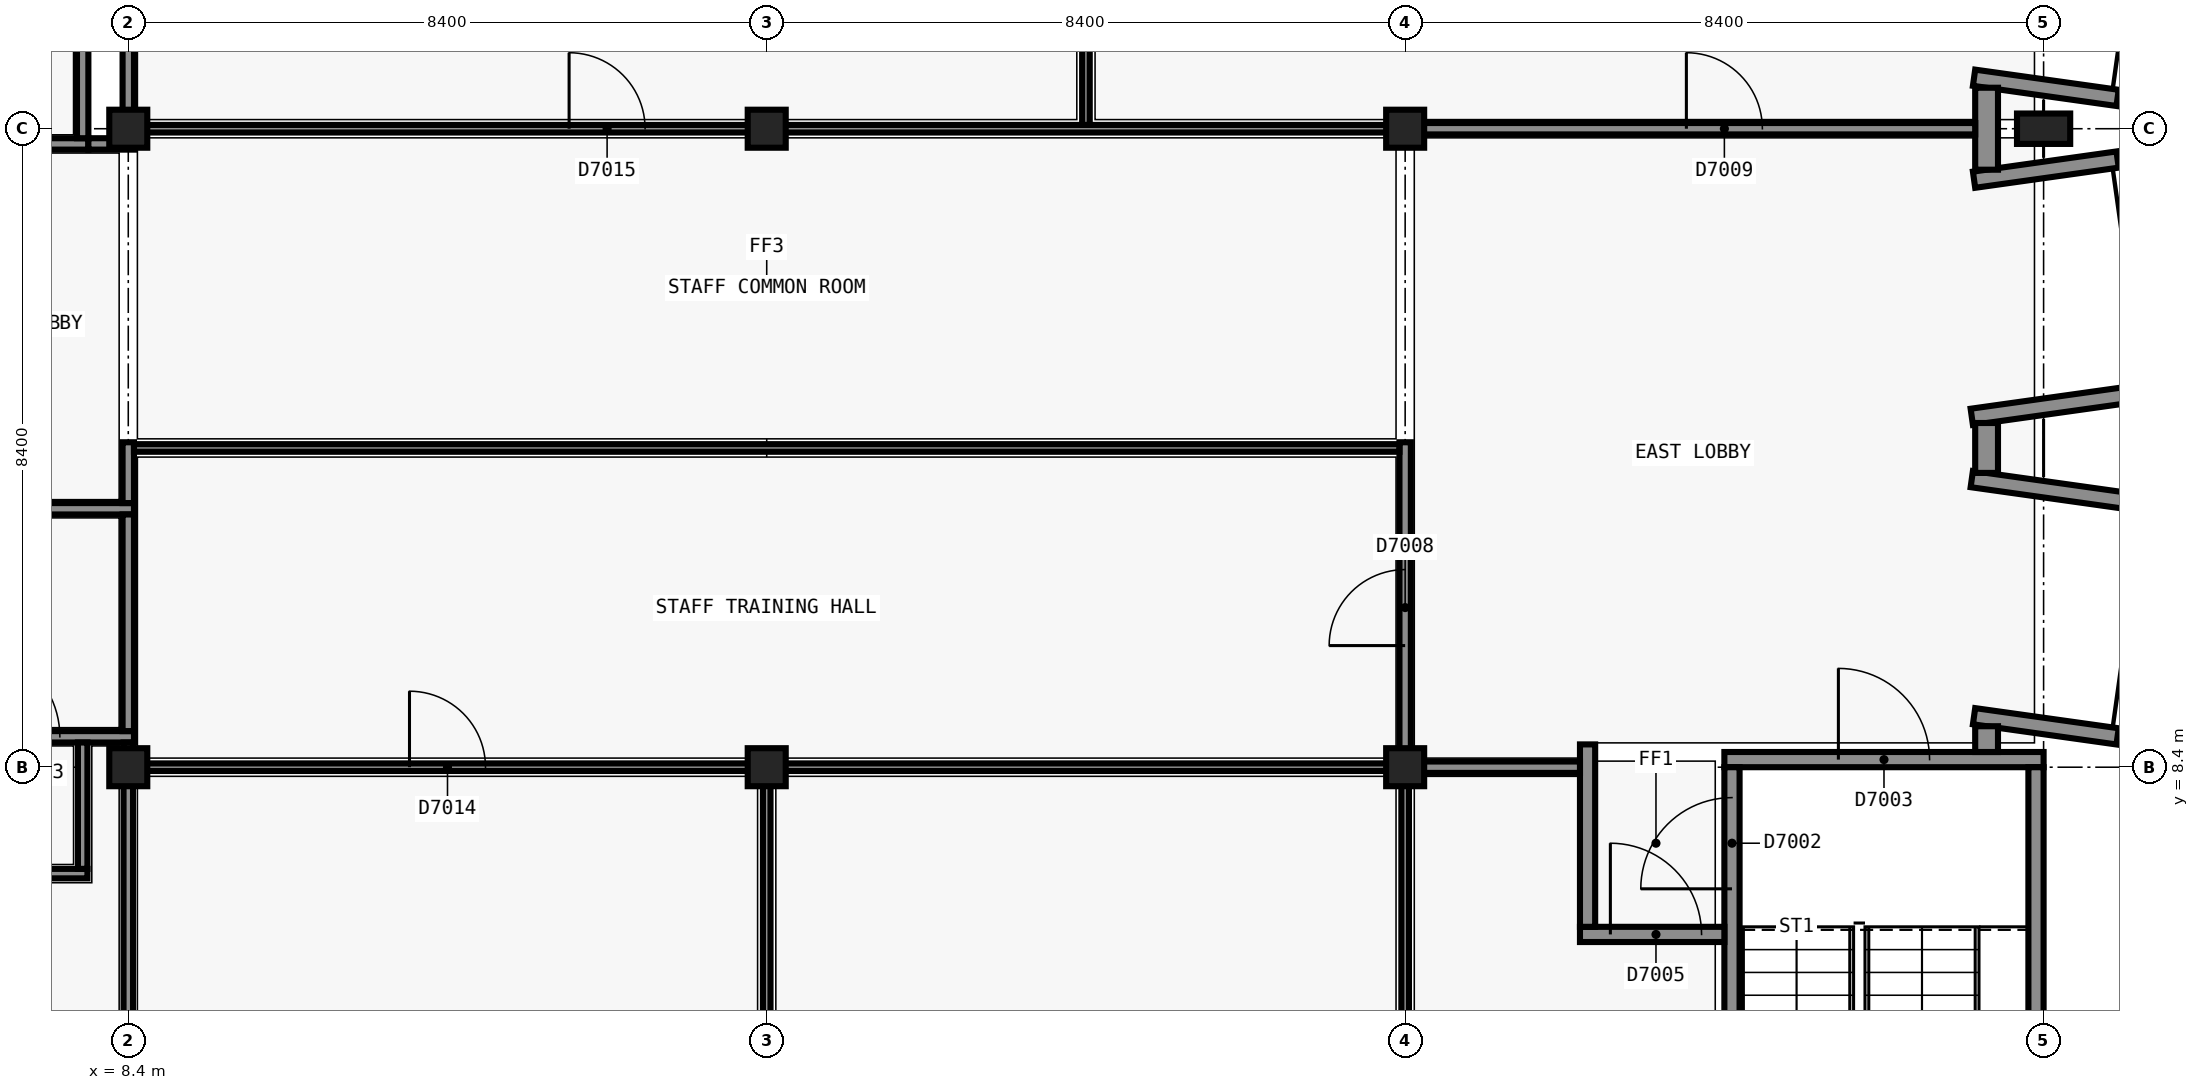
"""IFC4 building model, lengths in metres.
Left out: names, types, materials, properties, quantities, classifications, styles, units other than length and angle.
Written with IfcOpenShell. Run it as: python <this file> out.ifc"""

import sys

from ifc_helpers import new_model, si_unit, direction, frame, frame_2d, origin, origin_2d, place, context, subcontext, project, spatial, rectangle, extrude, element, fill, save


model = new_model("IFC4")
c1 = context("Model", 3, precision=1e-05, world=origin(), true_north=direction((0.0, 1.0)))
c2 = subcontext(c1, "Body", "Model", "MODEL_VIEW")
j1 = project(units=[si_unit("LENGTHUNIT", "METRE"), si_unit("PLANEANGLEUNIT", "RADIAN")], contexts=[c1])
p1 = place(None, origin())
s1 = spatial("IfcSite", under=j1, at=p1, CompositionType="ELEMENT")
p2 = place(p1, origin())
s2 = spatial("IfcBuilding", under=s1, at=p2, CompositionType="ELEMENT")
p3 = place(p2, frame((0.0, 0.0, 33.6)))
s3 = spatial("IfcBuildingStorey", under=s2, at=p3, CompositionType="ELEMENT", Elevation=33.6)
p4 = place(p3, frame((29.4, 8.5, 0.0), z_axis=(0.0, 0.0, 1.0), x_axis=(1.0, 0.0, 0.0)))
e1 = element("IfcWall", 1, at=p4, inside=s3, PredefinedType="SHEAR", context=c2, shape_type="SweptSolid", body=[
    extrude(rectangle(XDim=4.2, YDim=0.2, at=frame_2d((2.1, 0.0))), origin(), (0.0, 0.0, 1.0), 4.5),
])
p5 = place(p4, frame((1.5, 0.0, 0.0)))
e2 = element("IfcOpeningElement", 2, at=p5, cuts=e1, PredefinedType="OPENING", context=c2, shape_type="SweptSolid", body=[
    extrude(rectangle(XDim=1.2, YDim=2.1, at=frame_2d((0.6, 1.05))), frame((0.0, 0.11, 0.0), z_axis=(0.0, -1.0, 0.0), x_axis=(1.0, 0.0, 0.0)), (0.0, 0.0, 1.0), 0.22),
])
p6 = place(p3, frame((29.5, 0.2, 0.0), z_axis=(0.0, 0.0, 1.0), x_axis=(0.0, 1.0, 0.0)))
e3 = element("IfcWall", 3, at=p6, inside=s3, PredefinedType="SHEAR", context=c2, shape_type="SweptSolid", body=[
    extrude(rectangle(XDim=8.2, YDim=0.2, at=frame_2d((4.1, 0.0))), origin(), (0.0, 0.0, 1.0), 4.5),
])
p7 = place(p6, frame((6.6, 0.0, 0.0)))
e4 = element("IfcOpeningElement", 4, at=p7, cuts=e3, PredefinedType="OPENING", context=c2, shape_type="SweptSolid", body=[
    extrude(rectangle(XDim=1.2, YDim=2.1, at=frame_2d((0.6, 1.05))), frame((0.0, 0.11, 0.0), z_axis=(0.0, -1.0, 0.0), x_axis=(1.0, 0.0, 0.0)), (0.0, 0.0, 1.0), 0.22),
])
p8 = place(p3, frame((33.5, 8.4, 0.0), z_axis=(0.0, 0.0, 1.0), x_axis=(0.0, -1.0, 0.0)))
e5 = element("IfcWall", 5, at=p8, inside=s3, PredefinedType="SHEAR", context=c2, shape_type="SweptSolid", body=[
    extrude(rectangle(XDim=8.2, YDim=0.2, at=frame_2d((4.1, 0.0))), origin(), (0.0, 0.0, 1.0), 4.5),
])
for number, where, z_axis, x_axis in (
    (6, (8.4, 8.4, 0.0), (0.0, 0.0, 1.0), (1.0, 0.0, 0.0)),
    (7, (8.4, 16.8, 0.0), (0.0, 0.0, 1.0), (1.0, 0.0, 0.0)),
    (8, (16.8, 8.4, 0.0), (0.0, 0.0, 1.0), (1.0, 0.0, 0.0)),
    (9, (16.8, 16.8, 0.0), (0.0, 0.0, 1.0), (1.0, 0.0, 0.0)),
    (10, (25.2, 8.4, 0.0), (0.0, 0.0, 1.0), (1.0, 0.0, 0.0)),
    (11, (25.2, 16.8, 0.0), (0.0, 0.0, 1.0), (1.0, 0.0, 0.0)),
):
    element("IfcColumn", number, at=place(p3, frame(where, z_axis=z_axis, x_axis=x_axis)), inside=s3, PredefinedType="COLUMN", context=c2, shape_type="SweptSolid", body=[
        extrude(rectangle(XDim=0.5, YDim=0.5, at=origin_2d()), origin(), (0.0, 0.0, 1.0), 4.5),
    ])
p9 = place(p3, frame((33.6, 16.8, 0.0), z_axis=(0.0, 0.0, 1.0), x_axis=(0.0, 1.0, 0.0)))
e12 = element("IfcColumn", 12, at=p9, inside=s3, PredefinedType="COLUMN", context=c2, shape_type="SweptSolid", body=[
    extrude(rectangle(XDim=0.7, YDim=0.4, at=origin_2d()), origin(), (0.0, 0.0, 1.0), 4.5),
])
p10 = place(p3, frame((32.685, 9.071, 0.0), z_axis=(0.0, 0.0, 1.0), x_axis=(0.990269539441, -0.139162635989, 0.0)))
e13 = element("IfcWall", 13, at=p10, inside=s3, PredefinedType="SOLIDWALL", context=c2, shape_type="SweptSolid", body=[
    extrude(rectangle(XDim=1.907, YDim=0.215, at=frame_2d((0.954, 0.0))), origin(), (0.0, 0.0, 1.0), 4.2),
])
p11 = place(p3, frame((32.655, 12.19, 0.0), z_axis=(0.0, 0.0, 1.0), x_axis=(0.990276315141, -0.139114412161, 0.0)))
e14 = element("IfcWall", 14, at=p11, inside=s3, PredefinedType="SOLIDWALL", context=c2, shape_type="SweptSolid", body=[
    extrude(rectangle(XDim=2.371, YDim=0.215, at=frame_2d((1.186, 0.0))), origin(), (0.0, 0.0, 1.0), 4.2),
])
p12 = place(p3, frame((32.655, 13.01, 0.0), z_axis=(0.0, 0.0, 1.0), x_axis=(0.990262124675, 0.139215388641, 0.0)))
e15 = element("IfcWall", 15, at=p12, inside=s3, PredefinedType="SOLIDWALL", context=c2, shape_type="SweptSolid", body=[
    extrude(rectangle(XDim=2.371, YDim=0.215, at=frame_2d((1.186, 0.0))), origin(), (0.0, 0.0, 1.0), 4.2),
])
for number, where, z_axis, x_axis in (
    (16, (32.685, 16.129, 0.0), (0.0, 0.0, 1.0), (0.99, 0.139, 0.0)),
    (17, (32.685, 17.471, 0.0), (0.0, 0.0, 1.0), (0.99, -0.139, 0.0)),
):
    element("IfcWall", number, at=place(p3, frame(where, z_axis=z_axis, x_axis=x_axis)), inside=s3, PredefinedType="SOLIDWALL", context=c2, shape_type="SweptSolid", body=[
        extrude(rectangle(XDim=1.907, YDim=0.215, at=frame_2d((0.954, 0.0))), origin(), (0.0, 0.0, 1.0), 4.2),
    ])
p13 = place(p3, frame((32.85, 8.939, 0.0), z_axis=(0.0, 0.0, 1.0), x_axis=(0.0, -1.0, 0.0)))
e18 = element("IfcWall", 18, at=p13, inside=s3, PredefinedType="SOLIDWALL", context=c2, shape_type="SweptSolid", body=[
    extrude(rectangle(XDim=0.339, YDim=0.3, at=frame_2d((0.169, 0.0))), origin(), (0.0, 0.0, 1.0), 4.2),
])
p14 = place(p3, frame((32.85, 12.928, 0.0), z_axis=(0.0, 0.0, 1.0), x_axis=(0.0, -1.0, 0.0)))
e19 = element("IfcWall", 19, at=p14, inside=s3, PredefinedType="SOLIDWALL", context=c2, shape_type="SweptSolid", body=[
    extrude(rectangle(XDim=0.657, YDim=0.3, at=frame_2d((0.329, 0.0))), origin(), (0.0, 0.0, 1.0), 4.2),
])
p15 = place(p3, frame((32.85, 17.339, 0.0), z_axis=(0.0, 0.0, 1.0), x_axis=(0.0, -1.0, 0.0)))
e20 = element("IfcWall", 20, at=p15, inside=s3, PredefinedType="SOLIDWALL", context=c2, shape_type="SweptSolid", body=[
    extrude(rectangle(XDim=1.078, YDim=0.3, at=frame_2d((0.539, 0.0))), origin(), (0.0, 0.0, 1.0), 4.2),
])
p16 = place(p3, frame((27.5, 6.2, 0.0), z_axis=(0.0, 0.0, 1.0), x_axis=(1.0, 0.0, 0.0)))
e21 = element("IfcWall", 21, at=p16, inside=s3, PredefinedType="SOLIDWALL", context=c2, shape_type="SweptSolid", body=[
    extrude(rectangle(XDim=1.9, YDim=0.2, at=frame_2d((0.95, 0.0))), origin(), (0.0, 0.0, 1.0), 4.2),
])
p17 = place(p16, frame((0.4, 0.0, 0.0)))
e22 = element("IfcOpeningElement", 22, at=p17, cuts=e21, PredefinedType="OPENING", context=c2, shape_type="SweptSolid", body=[
    extrude(rectangle(XDim=1.2, YDim=2.1, at=frame_2d((0.6, 1.05))), frame((0.0, 0.11, 0.0), z_axis=(0.0, -1.0, 0.0), x_axis=(1.0, 0.0, 0.0)), (0.0, 0.0, 1.0), 0.22),
])
p18 = place(p3, frame((27.6, 6.3, 0.0), z_axis=(0.0, 0.0, 1.0), x_axis=(0.0, 1.0, 0.0)))
e23 = element("IfcWall", 23, at=p18, inside=s3, PredefinedType="SOLIDWALL", context=c2, shape_type="SweptSolid", body=[
    extrude(rectangle(XDim=2.4, YDim=0.2, at=frame_2d((1.2, 0.0))), origin(), (0.0, 0.0, 1.0), 3.7),
])
p19 = place(p3, frame((25.125, 8.4, 0.0), z_axis=(0.0, 0.0, 1.0), x_axis=(1.0, 0.0, 0.0)))
e24 = element("IfcWall", 24, at=p19, inside=s3, PredefinedType="PARTITIONING", context=c2, shape_type="SweptSolid", body=[
    extrude(rectangle(XDim=2.375, YDim=0.15, at=frame_2d((1.188, 0.0))), origin(), (0.0, 0.0, 1.0), 3.5),
])
p20 = place(p3, frame((6.1, 16.6, 0.0), z_axis=(0.0, 0.0, 1.0), x_axis=(1.0, 0.0, 0.0)))
e25 = element("IfcWall", 25, at=p20, inside=s3, PredefinedType="PARTITIONING", context=c2, shape_type="SweptSolid", body=[
    extrude(rectangle(XDim=1.775, YDim=0.15, at=frame_2d((0.887, 0.0))), origin(), (0.0, 0.0, 1.0), 3.7),
])
p21 = place(p3, frame((25.125, 16.8, 0.0), z_axis=(0.0, 0.0, 1.0), x_axis=(1.0, 0.0, 0.0)))
e26 = element("IfcWall", 26, at=p21, inside=s3, PredefinedType="PARTITIONING", context=c2, shape_type="SweptSolid", body=[
    extrude(rectangle(XDim=7.575, YDim=0.15, at=frame_2d((3.788, 0.0))), origin(), (0.0, 0.0, 1.0), 3.5),
])
p22 = place(p21, frame((3.775, 0.0, 0.0)))
e27 = element("IfcOpeningElement", 27, at=p22, cuts=e26, PredefinedType="OPENING", context=c2, shape_type="SweptSolid", body=[
    extrude(rectangle(XDim=1.0, YDim=2.1, at=frame_2d((0.5, 1.05))), frame((0.0, 0.085, 0.0), z_axis=(0.0, -1.0, 0.0), x_axis=(1.0, 0.0, 0.0)), (0.0, 0.0, 1.0), 0.17),
])
p23 = place(p3, frame((6.1, 8.8, 0.0), z_axis=(0.0, 0.0, 1.0), x_axis=(1.0, 0.0, 0.0)))
e28 = element("IfcWall", 28, at=p23, inside=s3, PredefinedType="SOLIDWALL", context=c2, shape_type="SweptSolid", body=[
    extrude(rectangle(XDim=2.375, YDim=0.15, at=frame_2d((1.188, 0.0))), origin(), (0.0, 0.0, 1.0), 3.5),
])
p24 = place(p23, frame((0.2, 0.0, 0.0)))
e29 = element("IfcOpeningElement", 29, at=p24, cuts=e28, PredefinedType="OPENING", context=c2, shape_type="SweptSolid", body=[
    extrude(rectangle(XDim=1.2, YDim=2.1, at=frame_2d((0.6, 1.05))), frame((0.0, 0.085, 0.0), z_axis=(0.0, -1.0, 0.0), x_axis=(1.0, 0.0, 0.0)), (0.0, 0.0, 1.0), 0.17),
])
p25 = place(p3, frame((3.3, 11.8, 0.0), z_axis=(0.0, 0.0, 1.0), x_axis=(1.0, 0.0, 0.0)))
e30 = element("IfcWall", 30, at=p25, inside=s3, PredefinedType="SOLIDWALL", context=c2, shape_type="SweptSolid", body=[
    extrude(rectangle(XDim=5.175, YDim=0.15, at=frame_2d((2.587, 0.0))), origin(), (0.0, 0.0, 1.0), 3.5),
])
p26 = place(p3, frame((7.875, 16.6, 0.0), z_axis=(0.0, 0.0, 1.0), x_axis=(1.0, 0.0, 0.0)))
e31 = element("IfcWall", 31, at=p26, inside=s3, PredefinedType="SOLIDWALL", context=c2, shape_type="SweptSolid", body=[
    extrude(rectangle(XDim=0.6, YDim=0.15, at=frame_2d((0.3, 0.0))), origin(), (0.0, 0.0, 1.0), 3.5),
])
p27 = place(p3, frame((8.4, 11.875, 0.0), z_axis=(0.0, 0.0, 1.0), x_axis=(0.0, 1.0, 0.0)))
e32 = element("IfcWall", 32, at=p27, inside=s3, PredefinedType="PARTITIONING", context=c2, shape_type="SweptSolid", body=[
    extrude(rectangle(XDim=0.8, YDim=0.15, at=frame_2d((0.4, 0.0))), origin(), (0.0, 0.0, 1.0), 3.5),
])
p28 = place(p3, frame((25.2, 8.475, 0.0), z_axis=(0.0, 0.0, 1.0), x_axis=(0.0, 1.0, 0.0)))
e33 = element("IfcWall", 33, at=p28, inside=s3, PredefinedType="PARTITIONING", context=c2, shape_type="SweptSolid", body=[
    extrude(rectangle(XDim=4.2, YDim=0.15, at=frame_2d((2.1, 0.0))), origin(), (0.0, 0.0, 1.0), 3.5),
])
p29 = place(p28, frame((1.525, 0.0, 0.0)))
e34 = element("IfcOpeningElement", 34, at=p29, cuts=e33, PredefinedType="OPENING", context=c2, shape_type="SweptSolid", body=[
    extrude(rectangle(XDim=1.0, YDim=2.1, at=frame_2d((0.5, 1.05))), frame((0.0, 0.085, 0.0), z_axis=(0.0, -1.0, 0.0), x_axis=(1.0, 0.0, 0.0)), (0.0, 0.0, 1.0), 0.17),
])
p30 = place(p3, frame((8.4, 8.875, 0.0), z_axis=(0.0, 0.0, 1.0), x_axis=(0.0, 1.0, 0.0)))
e35 = element("IfcWall", 35, at=p30, inside=s3, PredefinedType="SOLIDWALL", context=c2, shape_type="SweptSolid", body=[
    extrude(rectangle(XDim=2.85, YDim=0.15, at=frame_2d((1.425, 0.0))), origin(), (0.0, 0.0, 1.0), 3.5),
])
p31 = place(p3, frame((7.8, 16.675, 0.0), z_axis=(0.0, 0.0, 1.0), x_axis=(0.0, 1.0, 0.0)))
e36 = element("IfcWall", 36, at=p31, inside=s3, PredefinedType="SOLIDWALL", context=c2, shape_type="SweptSolid", body=[
    extrude(rectangle(XDim=1.65, YDim=0.15, at=frame_2d((0.825, 0.0))), origin(), (0.0, 0.0, 1.0), 3.7),
])
p32 = place(p3, frame((8.4, 16.675, 0.0), z_axis=(0.0, 0.0, 1.0), x_axis=(0.0, 1.0, 0.0)))
e37 = element("IfcWall", 37, at=p32, inside=s3, PredefinedType="SOLIDWALL", context=c2, shape_type="SweptSolid", body=[
    extrude(rectangle(XDim=7.775, YDim=0.15, at=frame_2d((3.887, 0.0))), origin(), (0.0, 0.0, 1.0), 3.5),
])
p33 = place(p3, frame((6.1, 7.0, 0.0), z_axis=(0.0, 0.0, 1.0), x_axis=(1.0, 0.0, 0.0)))
e38 = element("IfcWall", 38, at=p33, inside=s3, PredefinedType="PARTITIONING", context=c2, shape_type="SweptSolid", body=[
    extrude(rectangle(XDim=1.762, YDim=0.125, at=frame_2d((0.881, 0.0))), origin(), (0.0, 0.0, 1.0), 4.2),
])
p34 = place(p3, frame((7.8, 7.062, 0.0), z_axis=(0.0, 0.0, 1.0), x_axis=(0.0, 1.0, 0.0)))
e39 = element("IfcWall", 39, at=p34, inside=s3, PredefinedType="PARTITIONING", context=c2, shape_type="SweptSolid", body=[
    extrude(rectangle(XDim=1.663, YDim=0.125, at=frame_2d((0.831, 0.0))), origin(), (0.0, 0.0, 1.0), 3.7),
])
p35 = place(p3, frame((8.4, 0.75, 0.0), z_axis=(0.0, 0.0, 1.0), x_axis=(0.0, 1.0, 0.0)))
e40 = element("IfcWall", 40, at=p35, inside=s3, PredefinedType="PARTITIONING", context=c2, shape_type="SweptSolid", body=[
    extrude(rectangle(XDim=7.975, YDim=0.125, at=frame_2d((3.988, 0.0))), origin(), (0.0, 0.0, 1.0), 3.5),
])
p36 = place(p3, frame((8.462, 8.4, 0.0), z_axis=(0.0, 0.0, 1.0), x_axis=(1.0, 0.0, 0.0)))
e41 = element("IfcWall", 41, at=p36, inside=s3, PredefinedType="PARTITIONING", context=c2, shape_type="SweptSolid", body=[
    extrude(rectangle(XDim=16.663, YDim=0.1, at=frame_2d((8.331, 0.0))), origin(), (0.0, 0.0, 1.0), 3.5),
])
p37 = place(p36, frame((3.637, 0.0, 0.0)))
e42 = element("IfcOpeningElement", 42, at=p37, cuts=e41, PredefinedType="OPENING", context=c2, shape_type="SweptSolid", body=[
    extrude(rectangle(XDim=1.0, YDim=2.1, at=frame_2d((0.5, 1.05))), frame((0.0, 0.06, 0.0), z_axis=(0.0, -1.0, 0.0), x_axis=(1.0, 0.0, 0.0)), (0.0, 0.0, 1.0), 0.12),
])
p38 = place(p3, frame((8.475, 12.6, 0.0), z_axis=(0.0, 0.0, 1.0), x_axis=(1.0, 0.0, 0.0)))
e43 = element("IfcWall", 43, at=p38, inside=s3, PredefinedType="PARTITIONING", context=c2, shape_type="SweptSolid", body=[
    extrude(rectangle(XDim=16.65, YDim=0.1, at=frame_2d((8.325, 0.0))), origin(), (0.0, 0.0, 1.0), 3.5),
])
p39 = place(p3, frame((8.475, 16.8, 0.0), z_axis=(0.0, 0.0, 1.0), x_axis=(1.0, 0.0, 0.0)))
e44 = element("IfcWall", 44, at=p39, inside=s3, PredefinedType="PARTITIONING", context=c2, shape_type="SweptSolid", body=[
    extrude(rectangle(XDim=16.65, YDim=0.1, at=frame_2d((8.325, 0.0))), origin(), (0.0, 0.0, 1.0), 3.5),
])
p40 = place(p39, frame((5.725, 0.0, 0.0)))
e45 = element("IfcOpeningElement", 45, at=p40, cuts=e44, PredefinedType="OPENING", context=c2, shape_type="SweptSolid", body=[
    extrude(rectangle(XDim=1.0, YDim=2.1, at=frame_2d((0.5, 1.05))), frame((0.0, 0.06, 0.0), z_axis=(0.0, -1.0, 0.0), x_axis=(1.0, 0.0, 0.0)), (0.0, 0.0, 1.0), 0.12),
])
p41 = place(p3, frame((16.8, 0.75, 0.0), z_axis=(0.0, 0.0, 1.0), x_axis=(0.0, 1.0, 0.0)))
e46 = element("IfcWall", 46, at=p41, inside=s3, PredefinedType="PARTITIONING", context=c2, shape_type="SweptSolid", body=[
    extrude(rectangle(XDim=7.6, YDim=0.1, at=frame_2d((3.8, 0.0))), origin(), (0.0, 0.0, 1.0), 3.5),
])
p42 = place(p3, frame((21.0, 16.85, 0.0), z_axis=(0.0, 0.0, 1.0), x_axis=(0.0, 1.0, 0.0)))
e47 = element("IfcWall", 47, at=p42, inside=s3, PredefinedType="PARTITIONING", context=c2, shape_type="SweptSolid", body=[
    extrude(rectangle(XDim=7.6, YDim=0.1, at=frame_2d((3.8, 0.0))), origin(), (0.0, 0.0, 1.0), 3.5),
])
p43 = place(p3, frame((25.2, 0.75, 0.0), z_axis=(0.0, 0.0, 1.0), x_axis=(0.0, 1.0, 0.0)))
e48 = element("IfcWall", 48, at=p43, inside=s3, PredefinedType="PARTITIONING", context=c2, shape_type="SweptSolid", body=[
    extrude(rectangle(XDim=7.575, YDim=0.1, at=frame_2d((3.788, 0.0))), origin(), (0.0, 0.0, 1.0), 3.5),
])
p44 = place(p43, frame((2.95, 0.0, 0.0)))
e49 = element("IfcOpeningElement", 49, at=p44, cuts=e48, PredefinedType="OPENING", context=c2, shape_type="SweptSolid", body=[
    extrude(rectangle(XDim=1.0, YDim=2.1, at=frame_2d((0.5, 1.05))), frame((0.0, 0.06, 0.0), z_axis=(0.0, -1.0, 0.0), x_axis=(1.0, 0.0, 0.0)), (0.0, 0.0, 1.0), 0.12),
])
p45 = place(p7, origin())
e50 = element("IfcDoor", 50, at=p45, inside=s3, OperationType="SINGLE_SWING_RIGHT", PredefinedType="DOOR", context=c2, shape_type="SweptSolid", body=[
    extrude(rectangle(XDim=1.2, YDim=2.1, at=frame_2d((0.6, 1.05))), frame((0.0, 0.025, 0.0), z_axis=(0.0, -1.0, 0.0), x_axis=(1.0, 0.0, 0.0)), (0.0, 0.0, 1.0), 0.05),
])
fill(e4, e50)
p46 = place(p5, origin())
e51 = element("IfcDoor", 51, at=p46, inside=s3, OperationType="SINGLE_SWING_RIGHT", PredefinedType="DOOR", context=c2, shape_type="SweptSolid", body=[
    extrude(rectangle(XDim=1.2, YDim=2.1, at=frame_2d((0.6, 1.05))), frame((0.0, 0.025, 0.0), z_axis=(0.0, -1.0, 0.0), x_axis=(1.0, 0.0, 0.0)), (0.0, 0.0, 1.0), 0.05),
])
fill(e2, e51)
p47 = place(p17, origin())
e52 = element("IfcDoor", 52, at=p47, inside=s3, OperationType="SINGLE_SWING_RIGHT", PredefinedType="DOOR", context=c2, shape_type="SweptSolid", body=[
    extrude(rectangle(XDim=1.2, YDim=2.1, at=frame_2d((0.6, 1.05))), frame((0.0, 0.025, 0.0), z_axis=(0.0, -1.0, 0.0), x_axis=(1.0, 0.0, 0.0)), (0.0, 0.0, 1.0), 0.05),
])
fill(e22, e52)
p48 = place(p29, origin())
e53 = element("IfcDoor", 53, at=p48, inside=s3, OperationType="SINGLE_SWING_RIGHT", PredefinedType="DOOR", context=c2, shape_type="SweptSolid", body=[
    extrude(rectangle(XDim=1.0, YDim=2.1, at=frame_2d((0.5, 1.05))), frame((0.0, 0.025, 0.0), z_axis=(0.0, -1.0, 0.0), x_axis=(1.0, 0.0, 0.0)), (0.0, 0.0, 1.0), 0.05),
])
fill(e34, e53)
p49 = place(p22, origin())
e54 = element("IfcDoor", 54, at=p49, inside=s3, OperationType="SINGLE_SWING_LEFT", PredefinedType="DOOR", context=c2, shape_type="SweptSolid", body=[
    extrude(rectangle(XDim=1.0, YDim=2.1, at=frame_2d((0.5, 1.05))), frame((0.0, 0.025, 0.0), z_axis=(0.0, -1.0, 0.0), x_axis=(1.0, 0.0, 0.0)), (0.0, 0.0, 1.0), 0.05),
])
fill(e27, e54)
p50 = place(p24, origin())
e55 = element("IfcDoor", 55, at=p50, inside=s3, OperationType="SINGLE_SWING_RIGHT", PredefinedType="DOOR", context=c2, shape_type="SweptSolid", body=[
    extrude(rectangle(XDim=1.2, YDim=2.1, at=frame_2d((0.6, 1.05))), frame((0.0, 0.025, 0.0), z_axis=(0.0, -1.0, 0.0), x_axis=(1.0, 0.0, 0.0)), (0.0, 0.0, 1.0), 0.05),
])
fill(e29, e55)
p51 = place(p37, origin())
e56 = element("IfcDoor", 56, at=p51, inside=s3, OperationType="SINGLE_SWING_RIGHT", PredefinedType="DOOR", context=c2, shape_type="SweptSolid", body=[
    extrude(rectangle(XDim=1.0, YDim=2.1, at=frame_2d((0.5, 1.05))), frame((0.0, 0.025, 0.0), z_axis=(0.0, -1.0, 0.0), x_axis=(1.0, 0.0, 0.0)), (0.0, 0.0, 1.0), 0.05),
])
fill(e42, e56)
p52 = place(p40, origin())
e57 = element("IfcDoor", 57, at=p52, inside=s3, OperationType="SINGLE_SWING_LEFT", PredefinedType="DOOR", context=c2, shape_type="SweptSolid", body=[
    extrude(rectangle(XDim=1.0, YDim=2.1, at=frame_2d((0.5, 1.05))), frame((0.0, 0.025, 0.0), z_axis=(0.0, -1.0, 0.0), x_axis=(1.0, 0.0, 0.0)), (0.0, 0.0, 1.0), 0.05),
])
fill(e45, e57)
save(model, sys.argv[1])
